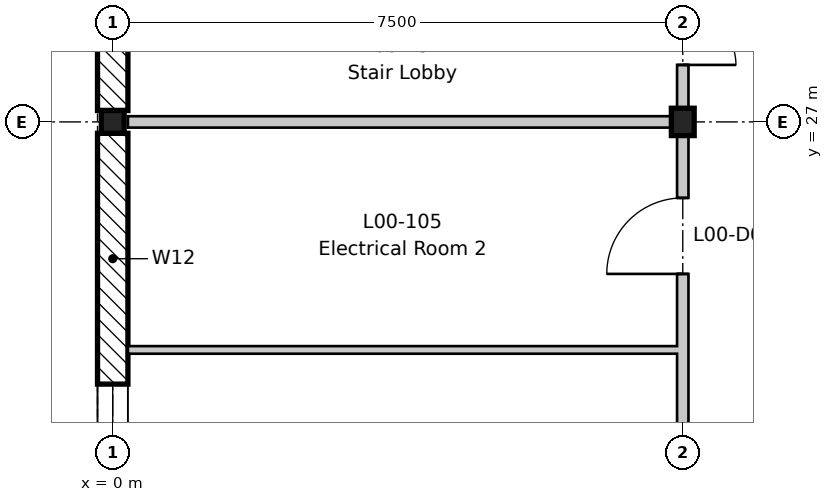
"""IFC4 building model, lengths in metres.
Left out: names, types, materials, properties, quantities, classifications, styles, units other than length and angle.
Written with IfcOpenShell. Run it as: python <this file> out.ifc"""

import sys

from ifc_helpers import new_model, si_unit, direction, frame, frame_2d, origin, origin_2d, place, context, subcontext, project, spatial, rectangle, i_section, extrude, element, fill, save


model = new_model("IFC4")
c1 = context("Model", 3, precision=1e-05, world=origin(), true_north=direction((0.0, 1.0)))
c2 = subcontext(c1, "Body", "Model", "MODEL_VIEW")
j1 = project(units=[si_unit("LENGTHUNIT", "METRE"), si_unit("PLANEANGLEUNIT", "RADIAN")], contexts=[c1])
p1 = place(None, origin())
s1 = spatial("IfcSite", under=j1, at=p1, CompositionType="ELEMENT")
p2 = place(p1, origin())
s2 = spatial("IfcBuilding", under=s1, at=p2, CompositionType="ELEMENT")
p3 = place(p2, origin())
s3 = spatial("IfcBuildingStorey", under=s2, at=p3, CompositionType="ELEMENT", Elevation=0.0)
p4 = place(p3, frame((0.0, 27.0, -0.6), z_axis=(0.0, 0.0, 1.0), x_axis=(1.0, 0.0, 0.0)))
e1 = element("IfcColumn", 1, at=p4, inside=s3, PredefinedType="COLUMN", context=c2, shape_type="SweptSolid", body=[
    extrude(i_section(OverallWidth=0.3, OverallDepth=0.3, WebThickness=0.011, FlangeThickness=0.019, FilletRadius=0.027, at=origin_2d()), origin(), (0.0, 0.0, 1.0), 5.8),
])
p5 = place(p3, frame((7.5, 27.0, -0.6), z_axis=(0.0, 0.0, 1.0), x_axis=(1.0, 0.0, 0.0)))
e2 = element("IfcColumn", 2, at=p5, inside=s3, PredefinedType="COLUMN", context=c2, shape_type="SweptSolid", body=[
    extrude(i_section(OverallWidth=0.3, OverallDepth=0.36, WebThickness=0.012, FlangeThickness=0.022, FilletRadius=0.027, at=origin_2d()), origin(), (0.0, 0.0, 1.0), 5.8),
])
p6 = place(p3, frame((0.0, 18.15, 0.0), z_axis=(0.0, 0.0, 1.0), x_axis=(0.0, 1.0, 0.0)))
e3 = element("IfcWall", 3, at=p6, inside=s3, PredefinedType="STANDARD", context=c2, shape_type="SweptSolid", body=[
    extrude(rectangle(XDim=8.7, YDim=0.4, at=frame_2d((4.35, 0.0))), origin(), (0.0, 0.0, 1.0), 4.8),
])
p7 = place(p6, frame((3.3, 0.0, 0.9)))
e4 = element("IfcOpeningElement", 4, at=p7, cuts=e3, PredefinedType="OPENING", context=c2, shape_type="SweptSolid", body=[
    extrude(rectangle(XDim=2.1, YDim=2.1, at=frame_2d((1.05, 1.05))), frame((0.0, 0.21, 0.0), z_axis=(0.0, -1.0, 0.0), x_axis=(1.0, 0.0, 0.0)), (0.0, 0.0, 1.0), 0.42),
])
p8 = place(p3, frame((0.0, 27.15, 0.0), z_axis=(0.0, 0.0, 1.0), x_axis=(0.0, 1.0, 0.0)))
e5 = element("IfcWall", 5, at=p8, inside=s3, PredefinedType="STANDARD", context=c2, shape_type="SweptSolid", body=[
    extrude(rectangle(XDim=8.7, YDim=0.4, at=frame_2d((4.35, 0.0))), origin(), (0.0, 0.0, 1.0), 4.8),
])
p9 = place(p8, frame((3.45, 0.0, 0.0)))
e6 = element("IfcOpeningElement", 6, at=p9, cuts=e5, PredefinedType="OPENING", context=c2, shape_type="SweptSolid", body=[
    extrude(rectangle(XDim=1.8, YDim=2.1, at=frame_2d((0.9, 1.05))), frame((0.0, 0.21, 0.0), z_axis=(0.0, -1.0, 0.0), x_axis=(1.0, 0.0, 0.0)), (0.0, 0.0, 1.0), 0.42),
])
p10 = place(p3, frame((0.2, 24.0, 0.0), z_axis=(0.0, 0.0, 1.0), x_axis=(1.0, 0.0, 0.0)))
e7 = element("IfcWall", 7, at=p10, inside=s3, PredefinedType="PARTITIONING", context=c2, shape_type="SweptSolid", body=[
    extrude(rectangle(XDim=7.225, YDim=0.1, at=frame_2d((3.613, 0.0))), origin(), (0.0, 0.0, 1.0), 5.2),
])
p11 = place(p3, frame((0.2, 27.0, 0.0), z_axis=(0.0, 0.0, 1.0), x_axis=(1.0, 0.0, 0.0)))
e8 = element("IfcWall", 8, at=p11, inside=s3, PredefinedType="PARTITIONING", context=c2, shape_type="SweptSolid", body=[
    extrude(rectangle(XDim=7.225, YDim=0.15, at=frame_2d((3.613, 0.0))), origin(), (0.0, 0.0, 1.0), 4.85),
])
p12 = place(p3, frame((7.5, -8.8, 0.0), z_axis=(0.0, 0.0, 1.0), x_axis=(0.0, 1.0, 0.0)))
e9 = element("IfcWall", 9, at=p12, inside=s3, PredefinedType="PARTITIONING", context=c2, shape_type="SweptSolid", body=[
    extrude(rectangle(XDim=79.3, YDim=0.15, at=frame_2d((39.65, 0.0))), origin(), (0.0, 0.0, 1.0), 4.68),
])
p13 = place(p12, frame((18.8, 0.0, 0.0)))
e10 = element("IfcOpeningElement", 10, at=p13, cuts=e9, PredefinedType="OPENING", context=c2, shape_type="SweptSolid", body=[
    extrude(rectangle(XDim=1.0, YDim=2.1, at=frame_2d((0.5, 1.05))), frame((0.0, 0.085, 0.0), z_axis=(0.0, -1.0, 0.0), x_axis=(1.0, 0.0, 0.0)), (0.0, 0.0, 1.0), 0.17),
])
p14 = place(p12, frame((23.3, 0.0, 0.0)))
e11 = element("IfcOpeningElement", 11, at=p14, cuts=e9, PredefinedType="OPENING", context=c2, shape_type="SweptSolid", body=[
    extrude(rectangle(XDim=1.0, YDim=2.1, at=frame_2d((0.5, 1.05))), frame((0.0, 0.085, 0.0), z_axis=(0.0, -1.0, 0.0), x_axis=(1.0, 0.0, 0.0)), (0.0, 0.0, 1.0), 0.17),
])
p15 = place(p12, frame((27.8, 0.0, 0.0)))
e12 = element("IfcOpeningElement", 12, at=p15, cuts=e9, PredefinedType="OPENING", context=c2, shape_type="SweptSolid", body=[
    extrude(rectangle(XDim=1.0, YDim=2.1, at=frame_2d((0.5, 1.05))), frame((0.0, 0.085, 0.0), z_axis=(0.0, -1.0, 0.0), x_axis=(1.0, 0.0, 0.0)), (0.0, 0.0, 1.0), 0.17),
])
p16 = place(p12, frame((30.8, 0.0, 0.0)))
e13 = element("IfcOpeningElement", 13, at=p16, cuts=e9, PredefinedType="OPENING", context=c2, shape_type="SweptSolid", body=[
    extrude(rectangle(XDim=1.0, YDim=2.1, at=frame_2d((0.5, 1.05))), frame((0.0, 0.085, 0.0), z_axis=(0.0, -1.0, 0.0), x_axis=(1.0, 0.0, 0.0)), (0.0, 0.0, 1.0), 0.17),
])
p17 = place(p12, frame((33.8, 0.0, 0.0)))
e14 = element("IfcOpeningElement", 14, at=p17, cuts=e9, PredefinedType="OPENING", context=c2, shape_type="SweptSolid", body=[
    extrude(rectangle(XDim=1.0, YDim=2.1, at=frame_2d((0.5, 1.05))), frame((0.0, 0.085, 0.0), z_axis=(0.0, -1.0, 0.0), x_axis=(1.0, 0.0, 0.0)), (0.0, 0.0, 1.0), 0.17),
])
p18 = place(p12, frame((48.6, 0.0, 0.0)))
e15 = element("IfcOpeningElement", 15, at=p18, cuts=e9, PredefinedType="OPENING", context=c2, shape_type="SweptSolid", body=[
    extrude(rectangle(XDim=1.4, YDim=2.1, at=frame_2d((0.7, 1.05))), frame((0.0, 0.085, 0.0), z_axis=(0.0, -1.0, 0.0), x_axis=(1.0, 0.0, 0.0)), (0.0, 0.0, 1.0), 0.17),
])
p19 = place(p12, frame((56.3, 0.0, 0.0)))
e16 = element("IfcOpeningElement", 16, at=p19, cuts=e9, PredefinedType="OPENING", context=c2, shape_type="SweptSolid", body=[
    extrude(rectangle(XDim=1.0, YDim=2.1, at=frame_2d((0.5, 1.05))), frame((0.0, 0.085, 0.0), z_axis=(0.0, -1.0, 0.0), x_axis=(1.0, 0.0, 0.0)), (0.0, 0.0, 1.0), 0.17),
])
p20 = place(p12, frame((60.8, 0.0, 0.0)))
e17 = element("IfcOpeningElement", 17, at=p20, cuts=e9, PredefinedType="OPENING", context=c2, shape_type="SweptSolid", body=[
    extrude(rectangle(XDim=1.0, YDim=2.1, at=frame_2d((0.5, 1.05))), frame((0.0, 0.085, 0.0), z_axis=(0.0, -1.0, 0.0), x_axis=(1.0, 0.0, 0.0)), (0.0, 0.0, 1.0), 0.17),
])
p21 = place(p12, frame((12.6, 0.0, 0.0)))
e18 = element("IfcOpeningElement", 18, at=p21, cuts=e9, PredefinedType="OPENING", context=c2, shape_type="SweptSolid", body=[
    extrude(rectangle(XDim=1.4, YDim=2.1, at=frame_2d((0.7, 1.05))), frame((0.0, 0.085, 0.0), z_axis=(0.0, -1.0, 0.0), x_axis=(1.0, 0.0, 0.0)), (0.0, 0.0, 1.0), 0.17),
])
p22 = place(p12, frame((3.6, 0.0, 0.0)))
e19 = element("IfcOpeningElement", 19, at=p22, cuts=e9, PredefinedType="OPENING", context=c2, shape_type="SweptSolid", body=[
    extrude(rectangle(XDim=1.4, YDim=2.1, at=frame_2d((0.7, 1.05))), frame((0.0, 0.085, 0.0), z_axis=(0.0, -1.0, 0.0), x_axis=(1.0, 0.0, 0.0)), (0.0, 0.0, 1.0), 0.17),
])
p23 = place(p12, frame((63.55, 0.0, 0.0)))
e20 = element("IfcOpeningElement", 20, at=p23, cuts=e9, PredefinedType="OPENING", context=c2, shape_type="SweptSolid", body=[
    extrude(rectangle(XDim=1.4, YDim=2.1, at=frame_2d((0.7, 1.05))), frame((0.0, 0.085, 0.0), z_axis=(0.0, -1.0, 0.0), x_axis=(1.0, 0.0, 0.0)), (0.0, 0.0, 1.0), 0.17),
])
p24 = place(p12, frame((69.6, 0.0, 0.0)))
e21 = element("IfcOpeningElement", 21, at=p24, cuts=e9, PredefinedType="OPENING", context=c2, shape_type="SweptSolid", body=[
    extrude(rectangle(XDim=1.4, YDim=2.1, at=frame_2d((0.7, 1.05))), frame((0.0, 0.085, 0.0), z_axis=(0.0, -1.0, 0.0), x_axis=(1.0, 0.0, 0.0)), (0.0, 0.0, 1.0), 0.17),
])
p25 = place(p12, frame((42.85, 0.0, 0.0)))
e22 = element("IfcOpeningElement", 22, at=p25, cuts=e9, PredefinedType="OPENING", context=c2, shape_type="SweptSolid", body=[
    extrude(rectangle(XDim=1.0, YDim=2.1, at=frame_2d((0.5, 1.05))), frame((0.0, 0.085, 0.0), z_axis=(0.0, -1.0, 0.0), x_axis=(1.0, 0.0, 0.0)), (0.0, 0.0, 1.0), 0.17),
])
p26 = place(p12, frame((36.55, 0.0, 0.0)))
e23 = element("IfcOpeningElement", 23, at=p26, cuts=e9, PredefinedType="OPENING", context=c2, shape_type="SweptSolid", body=[
    extrude(rectangle(XDim=1.4, YDim=2.1, at=frame_2d((0.7, 1.05))), frame((0.0, 0.085, 0.0), z_axis=(0.0, -1.0, 0.0), x_axis=(1.0, 0.0, 0.0)), (0.0, 0.0, 1.0), 0.17),
])
p27 = place(p12, frame((72.8, 0.0, 0.0)))
e24 = element("IfcOpeningElement", 24, at=p27, cuts=e9, PredefinedType="OPENING", context=c2, shape_type="SweptSolid", body=[
    extrude(rectangle(XDim=1.0, YDim=2.1, at=frame_2d((0.5, 1.05))), frame((0.0, 0.085, 0.0), z_axis=(0.0, -1.0, 0.0), x_axis=(1.0, 0.0, 0.0)), (0.0, 0.0, 1.0), 0.17),
])
p28 = place(p7, origin())
e25 = element("IfcWindow", 25, at=p28, inside=s3, PartitioningType="SINGLE_PANEL", PredefinedType="WINDOW", context=c2, shape_type="SweptSolid", body=[
    extrude(rectangle(XDim=2.1, YDim=2.1, at=frame_2d((1.05, 1.05))), frame((0.0, 0.03, 0.0), z_axis=(0.0, -1.0, 0.0), x_axis=(1.0, 0.0, 0.0)), (0.0, 0.0, 1.0), 0.06),
])
fill(e4, e25)
p29 = place(p17, origin())
e26 = element("IfcDoor", 26, at=p29, inside=s3, OperationType="SINGLE_SWING_LEFT", PredefinedType="DOOR", context=c2, shape_type="SweptSolid", body=[
    extrude(rectangle(XDim=1.0, YDim=2.1, at=frame_2d((0.5, 1.05))), frame((0.0, 0.025, 0.0), z_axis=(0.0, -1.0, 0.0), x_axis=(1.0, 0.0, 0.0)), (0.0, 0.0, 1.0), 0.05),
])
fill(e14, e26)
p30 = place(p26, frame((1.4, 0.0, 0.0), z_axis=(0.0, 0.0, 1.0), x_axis=(-1.0, 0.0, 0.0)))
e27 = element("IfcDoor", 27, at=p30, inside=s3, OperationType="DOUBLE_DOOR_SINGLE_SWING", PredefinedType="DOOR", context=c2, shape_type="SweptSolid", body=[
    extrude(rectangle(XDim=1.4, YDim=2.1, at=frame_2d((0.7, 1.05))), frame((0.0, 0.025, 0.0), z_axis=(0.0, -1.0, 0.0), x_axis=(1.0, 0.0, 0.0)), (0.0, 0.0, 1.0), 0.05),
])
fill(e23, e27)
save(model, sys.argv[1])
